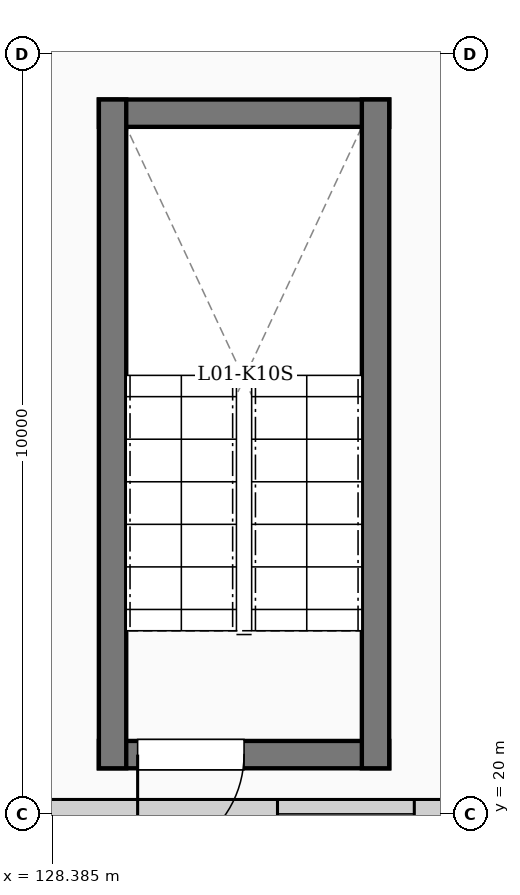
"""IFC4 building model, lengths in metres.
Left out: names, types, materials, properties, quantities, classifications, styles, units other than length and angle.
Written with IfcOpenShell. Run it as: python <this file> out.ifc"""

import sys

from ifc_helpers import new_model, si_unit, direction, frame, frame_2d, origin, place, context, subcontext, project, spatial, rectangle, extrude, element, fill, save


model = new_model("IFC4")
c1 = context("Model", 3, precision=1e-05, world=origin(), true_north=direction((0.0, 1.0)))
c2 = subcontext(c1, "Body", "Model", "MODEL_VIEW")
j1 = project(units=[si_unit("LENGTHUNIT", "METRE"), si_unit("PLANEANGLEUNIT", "RADIAN")], contexts=[c1])
p1 = place(None, origin())
s1 = spatial("IfcSite", under=j1, at=p1, CompositionType="ELEMENT")
p2 = place(p1, origin())
s2 = spatial("IfcBuilding", under=s1, at=p2, CompositionType="ELEMENT")
p3 = place(p2, frame((0.0, 0.0, 5.4)))
s3 = spatial("IfcBuildingStorey", under=s2, at=p3, CompositionType="ELEMENT", Elevation=5.4)
p4 = place(p3, frame((123.25, 20.0, 0.0), z_axis=(0.0, 0.0, 1.0), x_axis=(1.0, 0.0, 0.0)))
e1 = element("IfcWall", 1, at=p4, inside=s3, PredefinedType="SOLIDWALL", context=c2, shape_type="SweptSolid", body=[
    extrude(rectangle(XDim=12.5, YDim=0.38, at=frame_2d((6.25, 0.0))), origin(), (0.0, 0.0, 1.0), 3.87),
])
p5 = place(p4, frame((2.6, 0.0, 1.9)))
e2 = element("IfcOpeningElement", 2, at=p5, cuts=e1, PredefinedType="OPENING", context=c2, shape_type="SweptSolid", body=[
    extrude(rectangle(XDim=1.8, YDim=1.5, at=frame_2d((0.9, 0.75))), frame((0.0, 0.2, 0.0), z_axis=(0.0, -1.0, 0.0), x_axis=(1.0, 0.0, 0.0)), (0.0, 0.0, 1.0), 0.4),
])
p6 = place(p4, frame((8.1, 0.0, 1.9)))
e3 = element("IfcOpeningElement", 3, at=p6, cuts=e1, PredefinedType="OPENING", context=c2, shape_type="SweptSolid", body=[
    extrude(rectangle(XDim=1.8, YDim=1.5, at=frame_2d((0.9, 0.75))), frame((0.0, 0.2, 0.0), z_axis=(0.0, -1.0, 0.0), x_axis=(1.0, 0.0, 0.0)), (0.0, 0.0, 1.0), 0.4),
])
p7 = place(p3, frame((129.0, 20.78, 0.0), z_axis=(0.0, 0.0, 1.0), x_axis=(1.0, 0.0, 0.0)))
e4 = element("IfcWall", 4, at=p7, inside=s3, PredefinedType="SHEAR", context=c2, shape_type="SweptSolid", body=[
    extrude(rectangle(XDim=3.82, YDim=0.36, at=frame_2d((1.91, 0.0))), origin(), (0.0, 0.0, 1.0), 4.8),
])
p8 = place(p7, frame((0.51, 0.0, 0.0)))
e5 = element("IfcOpeningElement", 5, at=p8, cuts=e4, PredefinedType="OPENING", context=c2, shape_type="SweptSolid", body=[
    extrude(rectangle(XDim=1.4, YDim=2.35, at=frame_2d((0.7, 1.175))), frame((0.0, 0.19, 0.0), z_axis=(0.0, -1.0, 0.0), x_axis=(1.0, 0.0, 0.0)), (0.0, 0.0, 1.0), 0.38),
])
p9 = place(p3, frame((129.0, 29.22, 0.0), z_axis=(0.0, 0.0, 1.0), x_axis=(1.0, 0.0, 0.0)))
e6 = element("IfcWall", 6, at=p9, inside=s3, PredefinedType="SHEAR", context=c2, shape_type="SweptSolid", body=[
    extrude(rectangle(XDim=3.82, YDim=0.36, at=frame_2d((1.91, 0.0))), origin(), (0.0, 0.0, 1.0), 4.8),
])
for number, where, z_axis, x_axis in (
    (7, (129.18, 20.6, 0.0), (0.0, 0.0, 1.0), (0.0, 1.0, 0.0)),
    (8, (132.64, 20.6, 0.0), (0.0, 0.0, 1.0), (0.0, 1.0, 0.0)),
):
    element("IfcWall", number, at=place(p3, frame(where, z_axis=z_axis, x_axis=x_axis)), inside=s3, PredefinedType="SHEAR", context=c2, shape_type="SweptSolid", body=[
        extrude(rectangle(XDim=8.8, YDim=0.36, at=frame_2d((4.4, 0.0))), origin(), (0.0, 0.0, 1.0), 4.8),
    ])
p10 = place(p6, origin())
e9 = element("IfcWindow", 9, at=p10, inside=s3, PartitioningType="SINGLE_PANEL", PredefinedType="WINDOW", context=c2, shape_type="SweptSolid", body=[
    extrude(rectangle(XDim=1.8, YDim=1.5, at=frame_2d((0.9, 0.75))), frame((0.0, 0.03, 0.0), z_axis=(0.0, -1.0, 0.0), x_axis=(1.0, 0.0, 0.0)), (0.0, 0.0, 1.0), 0.06),
])
fill(e3, e9)
p11 = place(p8, origin())
e10 = element("IfcDoor", 10, at=p11, inside=s3, OperationType="SINGLE_SWING_LEFT", PredefinedType="DOOR", context=c2, shape_type="SweptSolid", body=[
    extrude(rectangle(XDim=1.4, YDim=2.35, at=frame_2d((0.7, 1.175))), frame((0.0, 0.025, 0.0), z_axis=(0.0, -1.0, 0.0), x_axis=(1.0, 0.0, 0.0)), (0.0, 0.0, 1.0), 0.05),
])
fill(e5, e10)
save(model, sys.argv[1])
